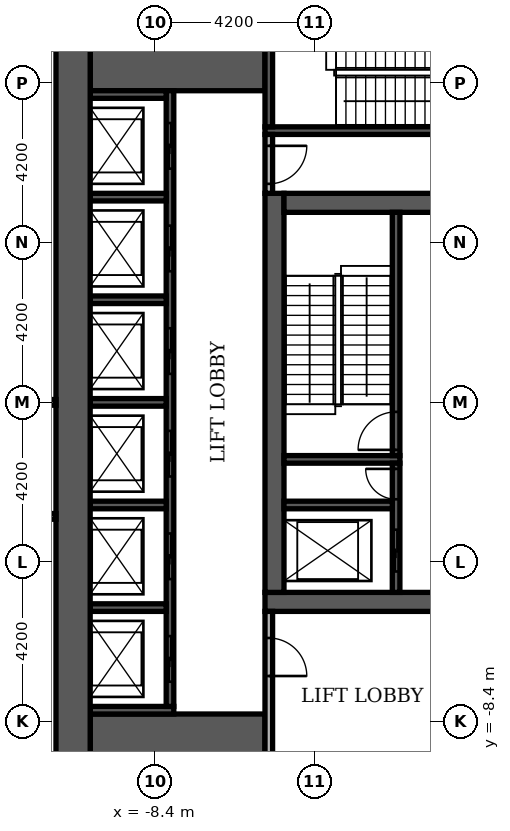
"""IFC4 building model, lengths in metres.
Left out: names, types, materials, properties, quantities, classifications, styles, units other than length and angle.
Written with IfcOpenShell. Run it as: python <this file> out.ifc"""

import sys

from ifc_helpers import new_model, si_unit, direction, frame, frame_2d, origin, place, context, subcontext, project, spatial, rectangle, extrude, element, fill, save


model = new_model("IFC4")
c1 = context("Model", 3, precision=1e-05, world=origin(), true_north=direction((0.0, 1.0)))
c2 = subcontext(c1, "Body", "Model", "MODEL_VIEW")
j1 = project(units=[si_unit("LENGTHUNIT", "METRE"), si_unit("PLANEANGLEUNIT", "RADIAN")], contexts=[c1])
p1 = place(None, origin())
s1 = spatial("IfcSite", under=j1, at=p1, CompositionType="ELEMENT")
p2 = place(p1, origin())
s2 = spatial("IfcBuilding", under=s1, at=p2, CompositionType="ELEMENT")
p3 = place(p2, frame((0.0, 0.0, 22.2)))
s3 = spatial("IfcBuildingStorey", under=s2, at=p3, CompositionType="ELEMENT", Elevation=22.2)
p4 = place(p3, frame((-5.5, -5.25, 0.0), z_axis=(0.0, 0.0, 1.0), x_axis=(1.0, 0.0, 0.0)))
e1 = element("IfcWall", 1, at=p4, inside=s3, PredefinedType="SHEAR", context=c2, shape_type="SweptSolid", body=[
    extrude(rectangle(XDim=11.0, YDim=0.5, at=frame_2d((5.5, 0.0))), origin(), (0.0, 0.0, 1.0), 4.3),
])
p5 = place(p4, frame((4.9, 0.0, 0.0)))
e2 = element("IfcOpeningElement", 2, at=p5, cuts=e1, PredefinedType="OPENING", context=c2, shape_type="SweptSolid", body=[
    extrude(rectangle(XDim=1.2, YDim=2.1, at=frame_2d((0.6, 1.05))), frame((0.0, 0.26, 0.0), z_axis=(0.0, -1.0, 0.0), x_axis=(1.0, 0.0, 0.0)), (0.0, 0.0, 1.0), 0.52),
])
p6 = place(p3, frame((-5.25, -5.0, 0.0), z_axis=(0.0, 0.0, 1.0), x_axis=(0.0, 1.0, 0.0)))
e3 = element("IfcWall", 3, at=p6, inside=s3, PredefinedType="SHEAR", context=c2, shape_type="SweptSolid", body=[
    extrude(rectangle(XDim=10.5, YDim=0.5, at=frame_2d((5.25, 0.0))), origin(), (0.0, 0.0, 1.0), 4.3),
])
p7 = place(p3, frame((-5.0, 5.25, 0.0), z_axis=(0.0, 0.0, 1.0), x_axis=(1.0, 0.0, 0.0)))
e4 = element("IfcWall", 4, at=p7, inside=s3, PredefinedType="SHEAR", context=c2, shape_type="SweptSolid", body=[
    extrude(rectangle(XDim=10.0, YDim=0.5, at=frame_2d((5.0, 0.0))), origin(), (0.0, 0.0, 1.0), 4.3),
])
p8 = place(p7, frame((4.4, 0.0, 0.0)))
e5 = element("IfcOpeningElement", 5, at=p8, cuts=e4, PredefinedType="OPENING", context=c2, shape_type="SweptSolid", body=[
    extrude(rectangle(XDim=1.2, YDim=2.1, at=frame_2d((0.6, 1.05))), frame((0.0, 0.26, 0.0), z_axis=(0.0, -1.0, 0.0), x_axis=(1.0, 0.0, 0.0)), (0.0, 0.0, 1.0), 0.52),
])
for number, where, z_axis, x_axis in (
    (6, (-10.1, -9.15, 0.0), (0.0, 0.0, 1.0), (1.0, 0.0, 0.0)),
    (7, (-10.1, 9.15, 0.0), (0.0, 0.0, 1.0), (1.0, 0.0, 0.0)),
):
    element("IfcWall", number, at=place(p3, frame(where, z_axis=z_axis, x_axis=x_axis)), inside=s3, PredefinedType="SHEAR", context=c2, shape_type="SweptSolid", body=[
        extrude(rectangle(XDim=4.6, YDim=1.9, at=frame_2d((2.3, 0.0))), origin(), (0.0, 0.0, 1.0), 4.3),
    ])
p9 = place(p3, frame((-5.0, -1.5, 0.0), z_axis=(0.0, 0.0, 1.0), x_axis=(1.0, 0.0, 0.0)))
e8 = element("IfcWall", 8, at=p9, inside=s3, PredefinedType="SHEAR", context=c2, shape_type="SweptSolid", body=[
    extrude(rectangle(XDim=3.05, YDim=0.2, at=frame_2d((1.525, 0.0))), origin(), (0.0, 0.0, 1.0), 4.3),
])
p10 = place(p3, frame((-2.05, -1.4, 0.0), z_axis=(0.0, 0.0, 1.0), x_axis=(0.0, 1.0, 0.0)))
e9 = element("IfcWall", 9, at=p10, inside=s3, PredefinedType="SHEAR", context=c2, shape_type="SweptSolid", body=[
    extrude(rectangle(XDim=6.4, YDim=0.2, at=frame_2d((3.2, 0.0))), origin(), (0.0, 0.0, 1.0), 4.3),
])
p11 = place(p10, frame((0.15, 0.0, 0.0)))
e10 = element("IfcOpeningElement", 10, at=p11, cuts=e9, PredefinedType="OPENING", context=c2, shape_type="SweptSolid", body=[
    extrude(rectangle(XDim=1.0, YDim=2.1, at=frame_2d((0.5, 1.05))), frame((0.0, 0.11, 0.0), z_axis=(0.0, -1.0, 0.0), x_axis=(1.0, 0.0, 0.0)), (0.0, 0.0, 1.0), 0.22),
])
p12 = place(p3, frame((-5.5, 7.15, 0.0), z_axis=(0.0, 0.0, 1.0), x_axis=(1.0, 0.0, 0.0)))
e11 = element("IfcWall", 11, at=p12, inside=s3, PredefinedType="SHEAR", context=c2, shape_type="SweptSolid", body=[
    extrude(rectangle(XDim=6.8, YDim=0.2, at=frame_2d((3.4, 0.0))), origin(), (0.0, 0.0, 1.0), 4.3),
])
p13 = place(p3, frame((-5.4, 7.25, 0.0), z_axis=(0.0, 0.0, 1.0), x_axis=(0.0, 1.0, 0.0)))
e12 = element("IfcWall", 12, at=p13, inside=s3, PredefinedType="SHEAR", context=c2, shape_type="SweptSolid", body=[
    extrude(rectangle(XDim=2.85, YDim=0.2, at=frame_2d((1.425, 0.0))), origin(), (0.0, 0.0, 1.0), 4.3),
])
p14 = place(p3, frame((-10.1, -8.1, 0.0), z_axis=(0.0, 0.0, 1.0), x_axis=(1.0, 0.0, 0.0)))
e13 = element("IfcWall", 13, at=p14, inside=s3, PredefinedType="SHEAR", context=c2, shape_type="SweptSolid", body=[
    extrude(rectangle(XDim=2.2, YDim=0.2, at=frame_2d((1.1, 0.0))), origin(), (0.0, 0.0, 1.0), 4.3),
])
p15 = place(p3, frame((-8.0, -8.0, 0.0), z_axis=(0.0, 0.0, 1.0), x_axis=(0.0, 1.0, 0.0)))
e14 = element("IfcWall", 14, at=p15, inside=s3, PredefinedType="SHEAR", context=c2, shape_type="SweptSolid", body=[
    extrude(rectangle(XDim=16.2, YDim=0.2, at=frame_2d((8.1, 0.0))), origin(), (0.0, 0.0, 1.0), 4.3),
])
p16 = place(p15, frame((0.65, 0.0, 0.0)))
e15 = element("IfcOpeningElement", 15, at=p16, cuts=e14, PredefinedType="OPENING", context=c2, shape_type="SweptSolid", body=[
    extrude(rectangle(XDim=1.2, YDim=2.1, at=frame_2d((0.6, 1.05))), frame((0.0, 0.11, 0.0), z_axis=(0.0, -1.0, 0.0), x_axis=(1.0, 0.0, 0.0)), (0.0, 0.0, 1.0), 0.22),
])
p17 = place(p15, frame((3.35, 0.0, 0.0)))
e16 = element("IfcOpeningElement", 16, at=p17, cuts=e14, PredefinedType="OPENING", context=c2, shape_type="SweptSolid", body=[
    extrude(rectangle(XDim=1.2, YDim=2.1, at=frame_2d((0.6, 1.05))), frame((0.0, 0.11, 0.0), z_axis=(0.0, -1.0, 0.0), x_axis=(1.0, 0.0, 0.0)), (0.0, 0.0, 1.0), 0.22),
])
p18 = place(p15, frame((6.05, 0.0, 0.0)))
e17 = element("IfcOpeningElement", 17, at=p18, cuts=e14, PredefinedType="OPENING", context=c2, shape_type="SweptSolid", body=[
    extrude(rectangle(XDim=1.2, YDim=2.1, at=frame_2d((0.6, 1.05))), frame((0.0, 0.11, 0.0), z_axis=(0.0, -1.0, 0.0), x_axis=(1.0, 0.0, 0.0)), (0.0, 0.0, 1.0), 0.22),
])
p19 = place(p15, frame((8.75, 0.0, 0.0)))
e18 = element("IfcOpeningElement", 18, at=p19, cuts=e14, PredefinedType="OPENING", context=c2, shape_type="SweptSolid", body=[
    extrude(rectangle(XDim=1.2, YDim=2.1, at=frame_2d((0.6, 1.05))), frame((0.0, 0.11, 0.0), z_axis=(0.0, -1.0, 0.0), x_axis=(1.0, 0.0, 0.0)), (0.0, 0.0, 1.0), 0.22),
])
p20 = place(p15, frame((11.45, 0.0, 0.0)))
e19 = element("IfcOpeningElement", 19, at=p20, cuts=e14, PredefinedType="OPENING", context=c2, shape_type="SweptSolid", body=[
    extrude(rectangle(XDim=1.2, YDim=2.1, at=frame_2d((0.6, 1.05))), frame((0.0, 0.11, 0.0), z_axis=(0.0, -1.0, 0.0), x_axis=(1.0, 0.0, 0.0)), (0.0, 0.0, 1.0), 0.22),
])
p21 = place(p15, frame((14.15, 0.0, 0.0)))
e20 = element("IfcOpeningElement", 20, at=p21, cuts=e14, PredefinedType="OPENING", context=c2, shape_type="SweptSolid", body=[
    extrude(rectangle(XDim=1.2, YDim=2.1, at=frame_2d((0.6, 1.05))), frame((0.0, 0.11, 0.0), z_axis=(0.0, -1.0, 0.0), x_axis=(1.0, 0.0, 0.0)), (0.0, 0.0, 1.0), 0.22),
])
p22 = place(p3, frame((-10.1, -5.4, 0.0), z_axis=(0.0, 0.0, 1.0), x_axis=(1.0, 0.0, 0.0)))
e21 = element("IfcWall", 21, at=p22, inside=s3, PredefinedType="SHEAR", context=c2, shape_type="SweptSolid", body=[
    extrude(rectangle(XDim=2.0, YDim=0.2, at=frame_2d((1.0, 0.0))), origin(), (0.0, 0.0, 1.0), 4.3),
])
p23 = place(p3, frame((-2.05, -5.0, 0.0), z_axis=(0.0, 0.0, 1.0), x_axis=(0.0, 1.0, 0.0)))
e22 = element("IfcWall", 22, at=p23, inside=s3, PredefinedType="SHEAR", context=c2, shape_type="SweptSolid", body=[
    extrude(rectangle(XDim=3.4, YDim=0.2, at=frame_2d((1.7, 0.0))), origin(), (0.0, 0.0, 1.0), 4.3),
])
p24 = place(p23, frame((0.55, 0.0, 0.0)))
e23 = element("IfcOpeningElement", 23, at=p24, cuts=e22, PredefinedType="OPENING", context=c2, shape_type="SweptSolid", body=[
    extrude(rectangle(XDim=1.1, YDim=2.1, at=frame_2d((0.55, 1.05))), frame((0.0, 0.11, 0.0), z_axis=(0.0, -1.0, 0.0), x_axis=(1.0, 0.0, 0.0)), (0.0, 0.0, 1.0), 0.22),
])
p25 = place(p23, frame((2.45, 0.0, 0.0)))
e24 = element("IfcOpeningElement", 24, at=p25, cuts=e22, PredefinedType="OPENING", context=c2, shape_type="SweptSolid", body=[
    extrude(rectangle(XDim=0.8, YDim=2.1, at=frame_2d((0.4, 1.05))), frame((0.0, 0.11, 0.0), z_axis=(0.0, -1.0, 0.0), x_axis=(1.0, 0.0, 0.0)), (0.0, 0.0, 1.0), 0.22),
])
p26 = place(p3, frame((-10.1, -2.7, 0.0), z_axis=(0.0, 0.0, 1.0), x_axis=(1.0, 0.0, 0.0)))
e25 = element("IfcWall", 25, at=p26, inside=s3, PredefinedType="SHEAR", context=c2, shape_type="SweptSolid", body=[
    extrude(rectangle(XDim=2.0, YDim=0.2, at=frame_2d((1.0, 0.0))), origin(), (0.0, 0.0, 1.0), 4.3),
])
p27 = place(p3, frame((-5.0, -2.7, 0.0), z_axis=(0.0, 0.0, 1.0), x_axis=(1.0, 0.0, 0.0)))
e26 = element("IfcWall", 26, at=p27, inside=s3, PredefinedType="SHEAR", context=c2, shape_type="SweptSolid", body=[
    extrude(rectangle(XDim=2.85, YDim=0.2, at=frame_2d((1.425, 0.0))), origin(), (0.0, 0.0, 1.0), 4.3),
])
for number, where, z_axis, x_axis in (
    (27, (-10.1, 0.0, 0.0), (0.0, 0.0, 1.0), (1.0, 0.0, 0.0)),
    (28, (-10.1, 2.7, 0.0), (0.0, 0.0, 1.0), (1.0, 0.0, 0.0)),
    (29, (-10.1, 5.4, 0.0), (0.0, 0.0, 1.0), (1.0, 0.0, 0.0)),
    (30, (-10.1, 8.1, 0.0), (0.0, 0.0, 1.0), (1.0, 0.0, 0.0)),
):
    element("IfcWall", number, at=place(p3, frame(where, z_axis=z_axis, x_axis=x_axis)), inside=s3, PredefinedType="SHEAR", context=c2, shape_type="SweptSolid", body=[
        extrude(rectangle(XDim=2.0, YDim=0.2, at=frame_2d((1.0, 0.0))), origin(), (0.0, 0.0, 1.0), 4.3),
    ])
p28 = place(p3, frame((-10.55, -10.1, 0.0), z_axis=(0.0, 0.0, 1.0), x_axis=(0.0, 1.0, 0.0)))
e31 = element("IfcWall", 31, at=p28, inside=s3, PredefinedType="SHEAR", context=c2, shape_type="SweptSolid", body=[
    extrude(rectangle(XDim=20.2, YDim=0.9, at=frame_2d((10.1, 0.0))), origin(), (0.0, 0.0, 1.0), 4.3),
])
p29 = place(p3, frame((-5.4, -10.1, 0.0), z_axis=(0.0, 0.0, 1.0), x_axis=(0.0, 1.0, 0.0)))
e32 = element("IfcWall", 32, at=p29, inside=s3, PredefinedType="PARTITIONING", context=c2, shape_type="SweptSolid", body=[
    extrude(rectangle(XDim=4.6, YDim=0.2, at=frame_2d((2.3, 0.0))), origin(), (0.0, 0.0, 1.0), 4.3),
])
p30 = place(p29, frame((2.9, 0.0, 0.0)))
e33 = element("IfcOpeningElement", 33, at=p30, cuts=e32, PredefinedType="OPENING", context=c2, shape_type="SweptSolid", body=[
    extrude(rectangle(XDim=1.0, YDim=2.1, at=frame_2d((0.5, 1.05))), frame((0.0, 0.11, 0.0), z_axis=(0.0, -1.0, 0.0), x_axis=(1.0, 0.0, 0.0)), (0.0, 0.0, 1.0), 0.22),
])
p31 = place(p3, frame((-5.4, 5.5, 0.0), z_axis=(0.0, 0.0, 1.0), x_axis=(0.0, 1.0, 0.0)))
e34 = element("IfcWall", 34, at=p31, inside=s3, PredefinedType="PARTITIONING", context=c2, shape_type="SweptSolid", body=[
    extrude(rectangle(XDim=1.55, YDim=0.2, at=frame_2d((0.775, 0.0))), origin(), (0.0, 0.0, 1.0), 4.3),
])
p32 = place(p31, frame((0.25, 0.0, 0.0)))
e35 = element("IfcOpeningElement", 35, at=p32, cuts=e34, PredefinedType="OPENING", context=c2, shape_type="SweptSolid", body=[
    extrude(rectangle(XDim=1.0, YDim=2.1, at=frame_2d((0.5, 1.05))), frame((0.0, 0.11, 0.0), z_axis=(0.0, -1.0, 0.0), x_axis=(1.0, 0.0, 0.0)), (0.0, 0.0, 1.0), 0.22),
])
p33 = place(p3, frame((-25.125, -3.0, 0.0), z_axis=(0.0, 0.0, 1.0), x_axis=(1.0, 0.0, 0.0)))
e36 = element("IfcWall", 36, at=p33, inside=s3, PredefinedType="PARTITIONING", context=c2, shape_type="SweptSolid", body=[
    extrude(rectangle(XDim=14.125, YDim=0.15, at=frame_2d((7.062, 0.0))), origin(), (0.0, 0.0, 1.0), 4.3),
])
p34 = place(p33, frame((6.525, 0.0, 0.0)))
e37 = element("IfcOpeningElement", 37, at=p34, cuts=e36, PredefinedType="OPENING", context=c2, shape_type="SweptSolid", body=[
    extrude(rectangle(XDim=1.0, YDim=2.1, at=frame_2d((0.5, 1.05))), frame((0.0, 0.085, 0.0), z_axis=(0.0, -1.0, 0.0), x_axis=(1.0, 0.0, 0.0)), (0.0, 0.0, 1.0), 0.17),
])
p35 = place(p3, frame((-24.6, 0.0, 0.0), z_axis=(0.0, 0.0, 1.0), x_axis=(1.0, 0.0, 0.0)))
e38 = element("IfcWall", 38, at=p35, inside=s3, PredefinedType="PARTITIONING", context=c2, shape_type="SweptSolid", body=[
    extrude(rectangle(XDim=13.6, YDim=0.15, at=frame_2d((6.8, 0.0))), origin(), (0.0, 0.0, 1.0), 4.3),
])
p36 = place(p16, origin())
e39 = element("IfcDoor", 39, at=p36, inside=s3, OperationType="SLIDING_TO_LEFT", PredefinedType="DOOR", context=c2, shape_type="SweptSolid", body=[
    extrude(rectangle(XDim=1.2, YDim=2.1, at=frame_2d((0.6, 1.05))), frame((0.0, 0.025, 0.0), z_axis=(0.0, -1.0, 0.0), x_axis=(1.0, 0.0, 0.0)), (0.0, 0.0, 1.0), 0.05),
])
fill(e15, e39)
p37 = place(p17, origin())
e40 = element("IfcDoor", 40, at=p37, inside=s3, OperationType="SLIDING_TO_LEFT", PredefinedType="DOOR", context=c2, shape_type="SweptSolid", body=[
    extrude(rectangle(XDim=1.2, YDim=2.1, at=frame_2d((0.6, 1.05))), frame((0.0, 0.025, 0.0), z_axis=(0.0, -1.0, 0.0), x_axis=(1.0, 0.0, 0.0)), (0.0, 0.0, 1.0), 0.05),
])
fill(e16, e40)
p38 = place(p18, origin())
e41 = element("IfcDoor", 41, at=p38, inside=s3, OperationType="SLIDING_TO_LEFT", PredefinedType="DOOR", context=c2, shape_type="SweptSolid", body=[
    extrude(rectangle(XDim=1.2, YDim=2.1, at=frame_2d((0.6, 1.05))), frame((0.0, 0.025, 0.0), z_axis=(0.0, -1.0, 0.0), x_axis=(1.0, 0.0, 0.0)), (0.0, 0.0, 1.0), 0.05),
])
fill(e17, e41)
p39 = place(p19, origin())
e42 = element("IfcDoor", 42, at=p39, inside=s3, OperationType="SLIDING_TO_LEFT", PredefinedType="DOOR", context=c2, shape_type="SweptSolid", body=[
    extrude(rectangle(XDim=1.2, YDim=2.1, at=frame_2d((0.6, 1.05))), frame((0.0, 0.025, 0.0), z_axis=(0.0, -1.0, 0.0), x_axis=(1.0, 0.0, 0.0)), (0.0, 0.0, 1.0), 0.05),
])
fill(e18, e42)
p40 = place(p20, origin())
e43 = element("IfcDoor", 43, at=p40, inside=s3, OperationType="SLIDING_TO_LEFT", PredefinedType="DOOR", context=c2, shape_type="SweptSolid", body=[
    extrude(rectangle(XDim=1.2, YDim=2.1, at=frame_2d((0.6, 1.05))), frame((0.0, 0.025, 0.0), z_axis=(0.0, -1.0, 0.0), x_axis=(1.0, 0.0, 0.0)), (0.0, 0.0, 1.0), 0.05),
])
fill(e19, e43)
p41 = place(p21, origin())
e44 = element("IfcDoor", 44, at=p41, inside=s3, OperationType="SLIDING_TO_LEFT", PredefinedType="DOOR", context=c2, shape_type="SweptSolid", body=[
    extrude(rectangle(XDim=1.2, YDim=2.1, at=frame_2d((0.6, 1.05))), frame((0.0, 0.025, 0.0), z_axis=(0.0, -1.0, 0.0), x_axis=(1.0, 0.0, 0.0)), (0.0, 0.0, 1.0), 0.05),
])
fill(e20, e44)
p42 = place(p24, origin())
e45 = element("IfcDoor", 45, at=p42, inside=s3, OperationType="SLIDING_TO_LEFT", PredefinedType="DOOR", context=c2, shape_type="SweptSolid", body=[
    extrude(rectangle(XDim=1.1, YDim=2.1, at=frame_2d((0.55, 1.05))), frame((0.0, 0.025, 0.0), z_axis=(0.0, -1.0, 0.0), x_axis=(1.0, 0.0, 0.0)), (0.0, 0.0, 1.0), 0.05),
])
fill(e23, e45)
p43 = place(p11, origin())
e46 = element("IfcDoor", 46, at=p43, inside=s3, OperationType="SINGLE_SWING_LEFT", PredefinedType="DOOR", context=c2, shape_type="SweptSolid", body=[
    extrude(rectangle(XDim=1.0, YDim=2.1, at=frame_2d((0.5, 1.05))), frame((0.0, 0.025, 0.0), z_axis=(0.0, -1.0, 0.0), x_axis=(1.0, 0.0, 0.0)), (0.0, 0.0, 1.0), 0.05),
])
fill(e10, e46)
p44 = place(p25, origin())
e47 = element("IfcDoor", 47, at=p44, inside=s3, OperationType="SINGLE_SWING_RIGHT", PredefinedType="DOOR", context=c2, shape_type="SweptSolid", body=[
    extrude(rectangle(XDim=0.8, YDim=2.1, at=frame_2d((0.4, 1.05))), frame((0.0, 0.025, 0.0), z_axis=(0.0, -1.0, 0.0), x_axis=(1.0, 0.0, 0.0)), (0.0, 0.0, 1.0), 0.05),
])
fill(e24, e47)
p45 = place(p32, frame((1.0, 0.0, 0.0), z_axis=(0.0, 0.0, 1.0), x_axis=(-1.0, 0.0, 0.0)))
e48 = element("IfcDoor", 48, at=p45, inside=s3, OperationType="SINGLE_SWING_RIGHT", PredefinedType="DOOR", context=c2, shape_type="SweptSolid", body=[
    extrude(rectangle(XDim=1.0, YDim=2.1, at=frame_2d((0.5, 1.05))), frame((0.0, 0.025, 0.0), z_axis=(0.0, -1.0, 0.0), x_axis=(1.0, 0.0, 0.0)), (0.0, 0.0, 1.0), 0.05),
])
fill(e35, e48)
p46 = place(p30, frame((1.0, 0.0, 0.0), z_axis=(0.0, 0.0, 1.0), x_axis=(-1.0, 0.0, 0.0)))
e49 = element("IfcDoor", 49, at=p46, inside=s3, OperationType="SINGLE_SWING_LEFT", PredefinedType="DOOR", context=c2, shape_type="SweptSolid", body=[
    extrude(rectangle(XDim=1.0, YDim=2.1, at=frame_2d((0.5, 1.05))), frame((0.0, 0.025, 0.0), z_axis=(0.0, -1.0, 0.0), x_axis=(1.0, 0.0, 0.0)), (0.0, 0.0, 1.0), 0.05),
])
fill(e33, e49)
save(model, sys.argv[1])
